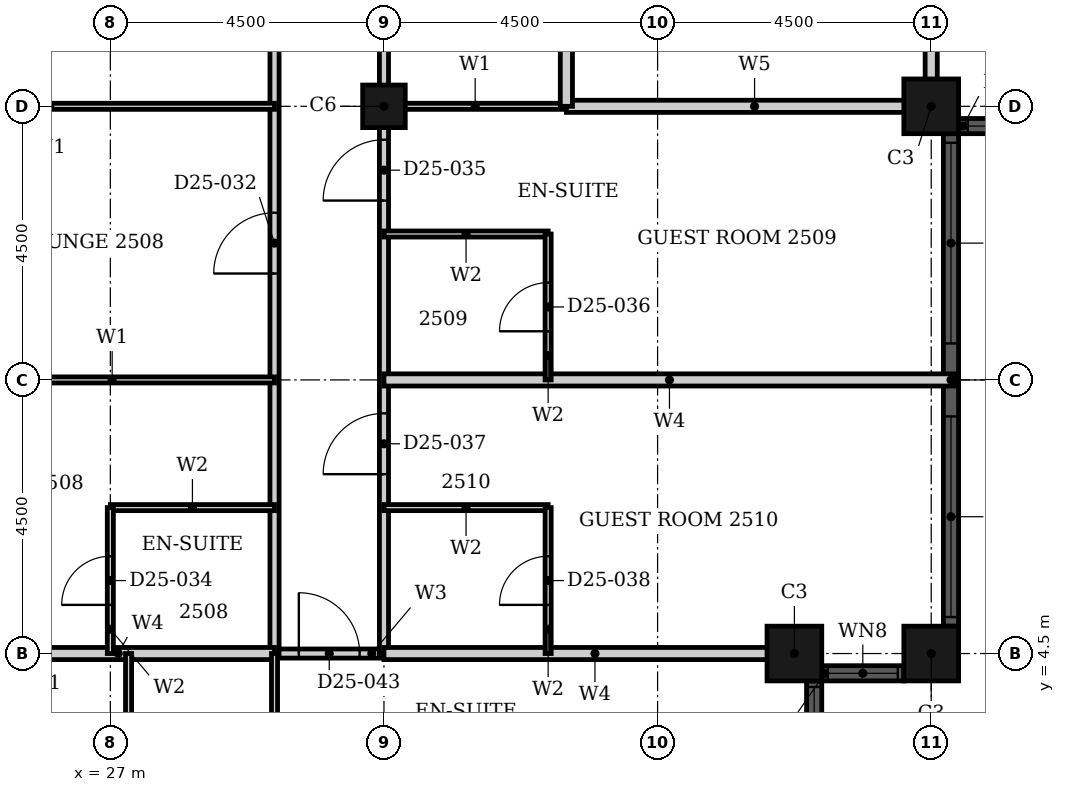
"""IFC4 building model, lengths in metres.
Left out: names, types, materials, properties, quantities, classifications, styles, units other than length and angle.
Written with IfcOpenShell. Run it as: python <this file> out.ifc"""

import sys

from ifc_helpers import new_model, si_unit, direction, frame, frame_2d, origin, origin_2d, place, context, subcontext, project, spatial, rectangle, hollow_rectangle, extrude, element, fill, save


model = new_model("IFC4")
c1 = context("Model", 3, precision=1e-05, world=origin(), true_north=direction((0.0, 1.0)))
c2 = subcontext(c1, "Body", "Model", "MODEL_VIEW")
j1 = project(units=[si_unit("LENGTHUNIT", "METRE"), si_unit("PLANEANGLEUNIT", "RADIAN")], contexts=[c1])
p1 = place(None, origin())
s1 = spatial("IfcSite", under=j1, at=p1, CompositionType="ELEMENT")
p2 = place(p1, origin())
s2 = spatial("IfcBuilding", under=s1, at=p2, CompositionType="ELEMENT")
p3 = place(p2, frame((0.0, 0.0, 104.4)))
s3 = spatial("IfcBuildingStorey", under=s2, at=p3, CompositionType="ELEMENT", Elevation=104.4)
for number, where, z_axis, x_axis in (
    (1, (38.25, 4.5, 0.0), (0.0, 0.0, 1.0), (1.0, 0.0, 0.0)),
    (2, (40.5, 4.5, 0.0), (0.0, 0.0, 1.0), (1.0, 0.0, 0.0)),
    (3, (40.5, 13.5, 0.0), (0.0, 0.0, 1.0), (1.0, 0.0, 0.0)),
):
    element("IfcColumn", number, at=place(p3, frame(where, z_axis=z_axis, x_axis=x_axis)), inside=s3, PredefinedType="COLUMN", context=c2, shape_type="SweptSolid", body=[
        extrude(hollow_rectangle(XDim=0.9, YDim=0.9, WallThickness=0.028, at=origin_2d()), origin(), (0.0, 0.0, 1.0), 3.6),
    ])
p4 = place(p3, frame((31.5, 13.5, 0.0), z_axis=(0.0, 0.0, 1.0), x_axis=(1.0, 0.0, 0.0)))
e4 = element("IfcColumn", 4, at=p4, inside=s3, PredefinedType="COLUMN", context=c2, shape_type="SweptSolid", body=[
    extrude(hollow_rectangle(XDim=0.7, YDim=0.7, WallThickness=0.022, at=origin_2d()), origin(), (0.0, 0.0, 1.0), 3.6),
])
p5 = place(p3, frame((38.575, 2.7, 0.0), z_axis=(0.0, 0.0, 1.0), x_axis=(0.0, 1.0, 0.0)))
e5 = element("IfcWall", 5, at=p5, inside=s3, PredefinedType="SOLIDWALL", context=c2, shape_type="SweptSolid", body=[
    extrude(rectangle(XDim=1.35, YDim=0.25, at=frame_2d((0.675, 0.0))), origin(), (0.0, 0.0, 1.0), 3.6),
])
p6 = place(p5, frame((0.1, 0.0, 0.9)))
e6 = element("IfcOpeningElement", 6, at=p6, cuts=e5, PredefinedType="OPENING", context=c2, shape_type="SweptSolid", body=[
    extrude(rectangle(XDim=1.15, YDim=2.08, at=frame_2d((0.575, 1.04))), frame((0.0, 0.135, 0.0), z_axis=(0.0, -1.0, 0.0), x_axis=(1.0, 0.0, 0.0)), (0.0, 0.0, 1.0), 0.27),
])
p7 = place(p3, frame((38.7, 4.175, 0.0), z_axis=(0.0, 0.0, 1.0), x_axis=(1.0, 0.0, 0.0)))
e7 = element("IfcWall", 7, at=p7, inside=s3, PredefinedType="SOLIDWALL", context=c2, shape_type="SweptSolid", body=[
    extrude(rectangle(XDim=1.35, YDim=0.25, at=frame_2d((0.675, 0.0))), origin(), (0.0, 0.0, 1.0), 3.6),
])
p8 = place(p7, frame((0.1, 0.0, 0.9)))
e8 = element("IfcOpeningElement", 8, at=p8, cuts=e7, PredefinedType="OPENING", context=c2, shape_type="SweptSolid", body=[
    extrude(rectangle(XDim=1.15, YDim=2.08, at=frame_2d((0.575, 1.04))), frame((0.0, 0.135, 0.0), z_axis=(0.0, -1.0, 0.0), x_axis=(1.0, 0.0, 0.0)), (0.0, 0.0, 1.0), 0.27),
])
p9 = place(p3, frame((40.825, 4.95, 0.0), z_axis=(0.0, 0.0, 1.0), x_axis=(0.0, 1.0, 0.0)))
e9 = element("IfcWall", 9, at=p9, inside=s3, PredefinedType="SOLIDWALL", context=c2, shape_type="SweptSolid", body=[
    extrude(rectangle(XDim=8.1, YDim=0.25, at=frame_2d((4.05, 0.0))), origin(), (0.0, 0.0, 1.0), 3.6),
])
p10 = place(p9, frame((0.15, 0.0, 0.9)))
e10 = element("IfcOpeningElement", 10, at=p10, cuts=e9, PredefinedType="OPENING", context=c2, shape_type="SweptSolid", body=[
    extrude(rectangle(XDim=3.3, YDim=2.08, at=frame_2d((1.65, 1.04))), frame((0.0, 0.135, 0.0), z_axis=(0.0, -1.0, 0.0), x_axis=(1.0, 0.0, 0.0)), (0.0, 0.0, 1.0), 0.27),
])
p11 = place(p9, frame((4.65, 0.0, 0.9)))
e11 = element("IfcOpeningElement", 11, at=p11, cuts=e9, PredefinedType="OPENING", context=c2, shape_type="SweptSolid", body=[
    extrude(rectangle(XDim=3.3, YDim=2.08, at=frame_2d((1.65, 1.04))), frame((0.0, 0.135, 0.0), z_axis=(0.0, -1.0, 0.0), x_axis=(1.0, 0.0, 0.0)), (0.0, 0.0, 1.0), 0.27),
])
p12 = place(p3, frame((40.95, 13.175, 0.0), z_axis=(0.0, 0.0, 1.0), x_axis=(1.0, 0.0, 0.0)))
e12 = element("IfcWall", 12, at=p12, inside=s3, PredefinedType="SOLIDWALL", context=c2, shape_type="SweptSolid", body=[
    extrude(rectangle(XDim=3.6, YDim=0.25, at=frame_2d((1.8, 0.0))), origin(), (0.0, 0.0, 1.0), 3.6),
])
p13 = place(p12, frame((0.15, 0.0, 0.9)))
e13 = element("IfcOpeningElement", 13, at=p13, cuts=e12, PredefinedType="OPENING", context=c2, shape_type="SweptSolid", body=[
    extrude(rectangle(XDim=3.3, YDim=2.08, at=frame_2d((1.65, 1.04))), frame((0.0, 0.135, 0.0), z_axis=(0.0, -1.0, 0.0), x_axis=(1.0, 0.0, 0.0)), (0.0, 0.0, 1.0), 0.27),
])
p14 = place(p3, frame((29.7, 4.5, 0.0), z_axis=(0.0, 0.0, 1.0), x_axis=(1.0, 0.0, 0.0)))
e14 = element("IfcWall", 14, at=p14, inside=s3, PredefinedType="PARTITIONING", context=c2, shape_type="SweptSolid", body=[
    extrude(rectangle(XDim=1.8, YDim=0.15, at=frame_2d((0.9, 0.0))), origin(), (0.0, 0.0, 1.0), 3.3),
])
p15 = place(p14, frame((0.4, 0.0, 0.0)))
e15 = element("IfcOpeningElement", 15, at=p15, cuts=e14, PredefinedType="OPENING", context=c2, shape_type="SweptSolid", body=[
    extrude(rectangle(XDim=1.0, YDim=2.1, at=frame_2d((0.5, 1.05))), frame((0.0, 0.085, 0.0), z_axis=(0.0, -1.0, 0.0), x_axis=(1.0, 0.0, 0.0)), (0.0, 0.0, 1.0), 0.17),
])
p16 = place(p3, frame((29.7, 4.5, 0.0), z_axis=(0.0, 0.0, 1.0), x_axis=(0.0, 1.0, 0.0)))
e16 = element("IfcWall", 16, at=p16, inside=s3, PredefinedType="PARTITIONING", context=c2, shape_type="SweptSolid", body=[
    extrude(rectangle(XDim=16.2, YDim=0.15, at=frame_2d((8.1, 0.0))), origin(), (0.0, 0.0, 1.0), 3.3),
])
p17 = place(p16, frame((6.25, 0.0, 0.0)))
e17 = element("IfcOpeningElement", 17, at=p17, cuts=e16, PredefinedType="OPENING", context=c2, shape_type="SweptSolid", body=[
    extrude(rectangle(XDim=1.0, YDim=2.1, at=frame_2d((0.5, 1.05))), frame((0.0, 0.085, 0.0), z_axis=(0.0, -1.0, 0.0), x_axis=(1.0, 0.0, 0.0)), (0.0, 0.0, 1.0), 0.17),
])
p18 = place(p3, frame((31.5, 4.5, 0.0), z_axis=(0.0, 0.0, 1.0), x_axis=(0.0, 1.0, 0.0)))
e18 = element("IfcWall", 18, at=p18, inside=s3, PredefinedType="PARTITIONING", context=c2, shape_type="SweptSolid", body=[
    extrude(rectangle(XDim=16.2, YDim=0.15, at=frame_2d((8.1, 0.0))), origin(), (0.0, 0.0, 1.0), 2.58),
])
p19 = place(p18, frame((7.45, 0.0, 0.0)))
e19 = element("IfcOpeningElement", 19, at=p19, cuts=e18, PredefinedType="OPENING", context=c2, shape_type="SweptSolid", body=[
    extrude(rectangle(XDim=1.0, YDim=2.1, at=frame_2d((0.5, 1.05))), frame((0.0, 0.085, 0.0), z_axis=(0.0, -1.0, 0.0), x_axis=(1.0, 0.0, 0.0)), (0.0, 0.0, 1.0), 0.17),
])
p20 = place(p18, frame((2.95, 0.0, 0.0)))
e20 = element("IfcOpeningElement", 20, at=p20, cuts=e18, PredefinedType="OPENING", context=c2, shape_type="SweptSolid", body=[
    extrude(rectangle(XDim=1.0, YDim=2.1, at=frame_2d((0.5, 1.05))), frame((0.0, 0.085, 0.0), z_axis=(0.0, -1.0, 0.0), x_axis=(1.0, 0.0, 0.0)), (0.0, 0.0, 1.0), 0.17),
])
p21 = place(p3, frame((31.5, 13.5, 0.0), z_axis=(0.0, 0.0, 1.0), x_axis=(1.0, 0.0, 0.0)))
e21 = element("IfcWall", 21, at=p21, inside=s3, PredefinedType="PARTITIONING", context=c2, shape_type="SweptSolid", body=[
    extrude(rectangle(XDim=3.0, YDim=0.1, at=frame_2d((1.5, 0.0))), origin(), (0.0, 0.0, 1.0), 2.38),
])
p22 = place(p3, frame((22.31, 13.5, 0.0), z_axis=(0.0, 0.0, 1.0), x_axis=(1.0, 0.0, 0.0)))
e22 = element("IfcWall", 22, at=p22, inside=s3, PredefinedType="PARTITIONING", context=c2, shape_type="SweptSolid", body=[
    extrude(rectangle(XDim=7.39, YDim=0.1, at=frame_2d((3.695, 0.0))), origin(), (0.0, 0.0, 1.0), 2.38),
])
p23 = place(p3, frame((22.11, 9.0, 0.0), z_axis=(0.0, 0.0, 1.0), x_axis=(1.0, 0.0, 0.0)))
e23 = element("IfcWall", 23, at=p23, inside=s3, PredefinedType="PARTITIONING", context=c2, shape_type="SweptSolid", body=[
    extrude(rectangle(XDim=7.59, YDim=0.1, at=frame_2d((3.795, 0.0))), origin(), (0.0, 0.0, 1.0), 3.3),
])
p24 = place(p23, frame((1.35, 0.0, 0.0)))
e24 = element("IfcOpeningElement", 24, at=p24, cuts=e23, PredefinedType="OPENING", context=c2, shape_type="SweptSolid", body=[
    extrude(rectangle(XDim=0.9, YDim=2.1, at=frame_2d((0.45, 1.05))), frame((0.0, 0.06, 0.0), z_axis=(0.0, -1.0, 0.0), x_axis=(1.0, 0.0, 0.0)), (0.0, 0.0, 1.0), 0.12),
])
p25 = place(p3, frame((31.5, 4.5, 0.0), z_axis=(0.0, 0.0, 1.0), x_axis=(1.0, 0.0, 0.0)))
e25 = element("IfcWall", 25, at=p25, inside=s3, PredefinedType="PARTITIONING", context=c2, shape_type="SweptSolid", body=[
    extrude(rectangle(XDim=6.94, YDim=0.2, at=frame_2d((3.47, 0.0))), origin(), (0.0, 0.0, 1.0), 3.3),
])
p26 = place(p3, frame((24.56, 4.5, 0.0), z_axis=(0.0, 0.0, 1.0), x_axis=(1.0, 0.0, 0.0)))
e26 = element("IfcWall", 26, at=p26, inside=s3, PredefinedType="PARTITIONING", context=c2, shape_type="SweptSolid", body=[
    extrude(rectangle(XDim=5.14, YDim=0.2, at=frame_2d((2.57, 0.0))), origin(), (0.0, 0.0, 1.0), 3.3),
])
p27 = place(p3, frame((31.5, 9.0, 0.0), z_axis=(0.0, 0.0, 1.0), x_axis=(1.0, 0.0, 0.0)))
e27 = element("IfcWall", 27, at=p27, inside=s3, PredefinedType="PARTITIONING", context=c2, shape_type="SweptSolid", body=[
    extrude(rectangle(XDim=9.39, YDim=0.2, at=frame_2d((4.695, 0.0))), origin(), (0.0, 0.0, 1.0), 3.3),
])
for number, where, z_axis, x_axis in (
    (28, (31.5, 11.4, 0.0), (0.0, 0.0, 1.0), (1.0, 0.0, 0.0)),
    (29, (31.5, 6.9, 0.0), (0.0, 0.0, 1.0), (1.0, 0.0, 0.0)),
    (30, (27.0, 6.9, 0.0), (0.0, 0.0, 1.0), (1.0, 0.0, 0.0)),
):
    element("IfcWall", number, at=place(p3, frame(where, z_axis=z_axis, x_axis=x_axis)), inside=s3, PredefinedType="PARTITIONING", context=c2, shape_type="SweptSolid", body=[
        extrude(rectangle(XDim=2.7, YDim=0.1, at=frame_2d((1.35, 0.0))), origin(), (0.0, 0.0, 1.0), 3.3),
    ])
p28 = place(p3, frame((27.0, 4.5, 0.0), z_axis=(0.0, 0.0, 1.0), x_axis=(0.0, 1.0, 0.0)))
e31 = element("IfcWall", 31, at=p28, inside=s3, PredefinedType="PARTITIONING", context=c2, shape_type="SweptSolid", body=[
    extrude(rectangle(XDim=2.4, YDim=0.1, at=frame_2d((1.2, 0.0))), origin(), (0.0, 0.0, 1.0), 2.58),
])
p29 = place(p28, frame((0.8, 0.0, 0.0)))
e32 = element("IfcOpeningElement", 32, at=p29, cuts=e31, PredefinedType="OPENING", context=c2, shape_type="SweptSolid", body=[
    extrude(rectangle(XDim=0.8, YDim=2.1, at=frame_2d((0.4, 1.05))), frame((0.0, 0.06, 0.0), z_axis=(0.0, -1.0, 0.0), x_axis=(1.0, 0.0, 0.0)), (0.0, 0.0, 1.0), 0.12),
])
for number, where, z_axis, x_axis in (
    (33, (27.3, 1.8, 0.0), (0.0, 0.0, 1.0), (0.0, 1.0, 0.0)),
    (34, (29.7, 1.8, 0.0), (0.0, 0.0, 1.0), (0.0, 1.0, 0.0)),
):
    element("IfcWall", number, at=place(p3, frame(where, z_axis=z_axis, x_axis=x_axis)), inside=s3, PredefinedType="PARTITIONING", context=c2, shape_type="SweptSolid", body=[
        extrude(rectangle(XDim=2.7, YDim=0.1, at=frame_2d((1.35, 0.0))), origin(), (0.0, 0.0, 1.0), 3.3),
    ])
p30 = place(p3, frame((34.2, 9.0, 0.0), z_axis=(0.0, 0.0, 1.0), x_axis=(0.0, 1.0, 0.0)))
e35 = element("IfcWall", 35, at=p30, inside=s3, PredefinedType="PARTITIONING", context=c2, shape_type="SweptSolid", body=[
    extrude(rectangle(XDim=2.4, YDim=0.1, at=frame_2d((1.2, 0.0))), origin(), (0.0, 0.0, 1.0), 3.3),
])
p31 = place(p30, frame((0.8, 0.0, 0.0)))
e36 = element("IfcOpeningElement", 36, at=p31, cuts=e35, PredefinedType="OPENING", context=c2, shape_type="SweptSolid", body=[
    extrude(rectangle(XDim=0.8, YDim=2.1, at=frame_2d((0.4, 1.05))), frame((0.0, 0.06, 0.0), z_axis=(0.0, -1.0, 0.0), x_axis=(1.0, 0.0, 0.0)), (0.0, 0.0, 1.0), 0.12),
])
p32 = place(p3, frame((34.2, 4.5, 0.0), z_axis=(0.0, 0.0, 1.0), x_axis=(0.0, 1.0, 0.0)))
e37 = element("IfcWall", 37, at=p32, inside=s3, PredefinedType="PARTITIONING", context=c2, shape_type="SweptSolid", body=[
    extrude(rectangle(XDim=2.4, YDim=0.1, at=frame_2d((1.2, 0.0))), origin(), (0.0, 0.0, 1.0), 3.3),
])
p33 = place(p32, frame((0.8, 0.0, 0.0)))
e38 = element("IfcOpeningElement", 38, at=p33, cuts=e37, PredefinedType="OPENING", context=c2, shape_type="SweptSolid", body=[
    extrude(rectangle(XDim=0.8, YDim=2.1, at=frame_2d((0.4, 1.05))), frame((0.0, 0.06, 0.0), z_axis=(0.0, -1.0, 0.0), x_axis=(1.0, 0.0, 0.0)), (0.0, 0.0, 1.0), 0.12),
])
p34 = place(p3, frame((34.5, 13.5, 0.0), z_axis=(0.0, 0.0, 1.0), x_axis=(1.0, 0.0, 0.0)))
e39 = element("IfcWall", 39, at=p34, inside=s3, PredefinedType="PARTITIONING", context=c2, shape_type="SweptSolid", body=[
    extrude(rectangle(XDim=6.19, YDim=0.2, at=frame_2d((3.095, 0.0))), origin(), (0.0, 0.0, 1.0), 2.38),
])
p35 = place(p3, frame((34.5, 13.5, 0.0), z_axis=(0.0, 0.0, 1.0), x_axis=(0.0, 1.0, 0.0)))
e40 = element("IfcWall", 40, at=p35, inside=s3, PredefinedType="PARTITIONING", context=c2, shape_type="SweptSolid", body=[
    extrude(rectangle(XDim=7.2, YDim=0.2, at=frame_2d((3.6, 0.0))), origin(), (0.0, 0.0, 1.0), 3.3),
])
p36 = place(p3, frame((40.5, 13.31, 0.0), z_axis=(0.0, 0.0, 1.0), x_axis=(0.0, 1.0, 0.0)))
e41 = element("IfcWall", 41, at=p36, inside=s3, PredefinedType="PARTITIONING", context=c2, shape_type="SweptSolid", body=[
    extrude(rectangle(XDim=7.39, YDim=0.2, at=frame_2d((3.695, 0.0))), origin(), (0.0, 0.0, 1.0), 3.3),
])
p37 = place(p6, origin())
e42 = element("IfcWindow", 42, at=p37, inside=s3, PartitioningType="SINGLE_PANEL", PredefinedType="WINDOW", context=c2, shape_type="SweptSolid", body=[
    extrude(rectangle(XDim=1.15, YDim=2.08, at=frame_2d((0.575, 1.04))), frame((0.0, 0.03, 0.0), z_axis=(0.0, -1.0, 0.0), x_axis=(1.0, 0.0, 0.0)), (0.0, 0.0, 1.0), 0.06),
])
fill(e6, e42)
p38 = place(p8, origin())
e43 = element("IfcWindow", 43, at=p38, inside=s3, PartitioningType="SINGLE_PANEL", PredefinedType="WINDOW", context=c2, shape_type="SweptSolid", body=[
    extrude(rectangle(XDim=1.15, YDim=2.08, at=frame_2d((0.575, 1.04))), frame((0.0, 0.03, 0.0), z_axis=(0.0, -1.0, 0.0), x_axis=(1.0, 0.0, 0.0)), (0.0, 0.0, 1.0), 0.06),
])
fill(e8, e43)
p39 = place(p10, origin())
e44 = element("IfcWindow", 44, at=p39, inside=s3, PartitioningType="SINGLE_PANEL", PredefinedType="WINDOW", context=c2, shape_type="SweptSolid", body=[
    extrude(rectangle(XDim=3.3, YDim=2.08, at=frame_2d((1.65, 1.04))), frame((0.0, 0.03, 0.0), z_axis=(0.0, -1.0, 0.0), x_axis=(1.0, 0.0, 0.0)), (0.0, 0.0, 1.0), 0.06),
])
fill(e10, e44)
p40 = place(p11, origin())
e45 = element("IfcWindow", 45, at=p40, inside=s3, PartitioningType="SINGLE_PANEL", PredefinedType="WINDOW", context=c2, shape_type="SweptSolid", body=[
    extrude(rectangle(XDim=3.3, YDim=2.08, at=frame_2d((1.65, 1.04))), frame((0.0, 0.03, 0.0), z_axis=(0.0, -1.0, 0.0), x_axis=(1.0, 0.0, 0.0)), (0.0, 0.0, 1.0), 0.06),
])
fill(e11, e45)
p41 = place(p13, origin())
e46 = element("IfcWindow", 46, at=p41, inside=s3, PartitioningType="SINGLE_PANEL", PredefinedType="WINDOW", context=c2, shape_type="SweptSolid", body=[
    extrude(rectangle(XDim=3.3, YDim=2.08, at=frame_2d((1.65, 1.04))), frame((0.0, 0.03, 0.0), z_axis=(0.0, -1.0, 0.0), x_axis=(1.0, 0.0, 0.0)), (0.0, 0.0, 1.0), 0.06),
])
fill(e13, e46)
p42 = place(p17, origin())
e47 = element("IfcDoor", 47, at=p42, inside=s3, OperationType="SINGLE_SWING_LEFT", PredefinedType="DOOR", context=c2, shape_type="SweptSolid", body=[
    extrude(rectangle(XDim=1.0, YDim=2.1, at=frame_2d((0.5, 1.05))), frame((0.0, 0.025, 0.0), z_axis=(0.0, -1.0, 0.0), x_axis=(1.0, 0.0, 0.0)), (0.0, 0.0, 1.0), 0.05),
])
fill(e17, e47)
p43 = place(p29, origin())
e48 = element("IfcDoor", 48, at=p43, inside=s3, OperationType="SINGLE_SWING_RIGHT", PredefinedType="DOOR", context=c2, shape_type="SweptSolid", body=[
    extrude(rectangle(XDim=0.8, YDim=2.1, at=frame_2d((0.4, 1.05))), frame((0.0, 0.025, 0.0), z_axis=(0.0, -1.0, 0.0), x_axis=(1.0, 0.0, 0.0)), (0.0, 0.0, 1.0), 0.05),
])
fill(e32, e48)
p44 = place(p19, origin())
e49 = element("IfcDoor", 49, at=p44, inside=s3, OperationType="SINGLE_SWING_RIGHT", PredefinedType="DOOR", context=c2, shape_type="SweptSolid", body=[
    extrude(rectangle(XDim=1.0, YDim=2.1, at=frame_2d((0.5, 1.05))), frame((0.0, 0.025, 0.0), z_axis=(0.0, -1.0, 0.0), x_axis=(1.0, 0.0, 0.0)), (0.0, 0.0, 1.0), 0.05),
])
fill(e19, e49)
p45 = place(p31, origin())
e50 = element("IfcDoor", 50, at=p45, inside=s3, OperationType="SINGLE_SWING_LEFT", PredefinedType="DOOR", context=c2, shape_type="SweptSolid", body=[
    extrude(rectangle(XDim=0.8, YDim=2.1, at=frame_2d((0.4, 1.05))), frame((0.0, 0.025, 0.0), z_axis=(0.0, -1.0, 0.0), x_axis=(1.0, 0.0, 0.0)), (0.0, 0.0, 1.0), 0.05),
])
fill(e36, e50)
p46 = place(p20, origin())
e51 = element("IfcDoor", 51, at=p46, inside=s3, OperationType="SINGLE_SWING_RIGHT", PredefinedType="DOOR", context=c2, shape_type="SweptSolid", body=[
    extrude(rectangle(XDim=1.0, YDim=2.1, at=frame_2d((0.5, 1.05))), frame((0.0, 0.025, 0.0), z_axis=(0.0, -1.0, 0.0), x_axis=(1.0, 0.0, 0.0)), (0.0, 0.0, 1.0), 0.05),
])
fill(e20, e51)
p47 = place(p33, origin())
e52 = element("IfcDoor", 52, at=p47, inside=s3, OperationType="SINGLE_SWING_RIGHT", PredefinedType="DOOR", context=c2, shape_type="SweptSolid", body=[
    extrude(rectangle(XDim=0.8, YDim=2.1, at=frame_2d((0.4, 1.05))), frame((0.0, 0.025, 0.0), z_axis=(0.0, -1.0, 0.0), x_axis=(1.0, 0.0, 0.0)), (0.0, 0.0, 1.0), 0.05),
])
fill(e38, e52)
p48 = place(p15, origin())
e53 = element("IfcDoor", 53, at=p48, inside=s3, OperationType="SINGLE_SWING_LEFT", PredefinedType="DOOR", context=c2, shape_type="SweptSolid", body=[
    extrude(rectangle(XDim=1.0, YDim=2.1, at=frame_2d((0.5, 1.05))), frame((0.0, 0.025, 0.0), z_axis=(0.0, -1.0, 0.0), x_axis=(1.0, 0.0, 0.0)), (0.0, 0.0, 1.0), 0.05),
])
fill(e15, e53)
save(model, sys.argv[1])
